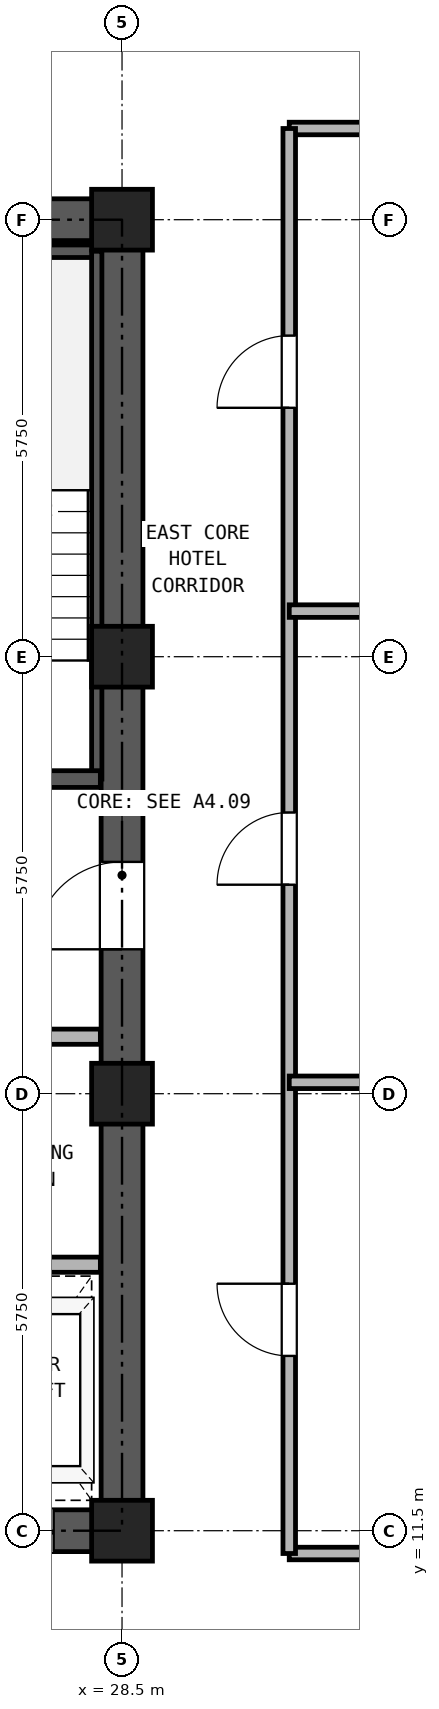
"""IFC4 building model, lengths in metres.
Left out: names, types, materials, properties, quantities, classifications, styles, units other than length and angle.
Written with IfcOpenShell. Run it as: python <this file> out.ifc"""

import sys

from ifc_helpers import new_model, si_unit, direction, frame, frame_2d, origin, origin_2d, place, context, subcontext, project, spatial, rectangle, hollow_rectangle, extrude, source, transform, mapped, element, fill, save


model = new_model("IFC4")
c1 = context("Model", 3, precision=1e-05, world=origin(), true_north=direction((0.0, 1.0)))
c2 = subcontext(c1, "Body", "Model", "MODEL_VIEW")
j1 = project(units=[si_unit("LENGTHUNIT", "METRE"), si_unit("PLANEANGLEUNIT", "RADIAN")], contexts=[c1])
p1 = place(None, origin())
s1 = spatial("IfcSite", under=j1, at=p1, CompositionType="ELEMENT")
p2 = place(p1, origin())
s2 = spatial("IfcBuilding", under=s1, at=p2, CompositionType="ELEMENT")
p3 = place(p2, frame((0.0, 0.0, 121.5)))
s3 = spatial("IfcBuildingStorey", under=s2, at=p3, CompositionType="ELEMENT", Elevation=121.5)
m1 = source(origin(), c2, "Body", "SweptSolid", [
    extrude(hollow_rectangle(XDim=0.8, YDim=0.8, WallThickness=0.045, at=origin_2d()), origin(), (0.0, 0.0, 1.0), 2.95),
])
for number, where, z_axis, x_axis in (
    (1, (28.5, 11.5, 0.0), (0.0, 0.0, 1.0), (1.0, 0.0, 0.0)),
    (2, (28.5, 17.25, 0.0), (0.0, 0.0, 1.0), (1.0, 0.0, 0.0)),
    (3, (28.5, 23.0, 0.0), (0.0, 0.0, 1.0), (1.0, 0.0, 0.0)),
    (4, (28.5, 28.75, 0.0), (0.0, 0.0, 1.0), (1.0, 0.0, 0.0)),
):
    element("IfcColumn", number, at=place(p3, frame(where, z_axis=z_axis, x_axis=x_axis)), inside=s3, PredefinedType="COLUMN", context=c2, shape_type="MappedRepresentation", body=[
        mapped(m1, transform((0.0, 0.0, 0.0), x_axis=(1.0, 0.0, 0.0), y_axis=(0.0, 1.0, 0.0), z_axis=(0.0, 0.0, 1.0), scale=1.0)),
    ])
p4 = place(p3, frame((18.225, 11.5, 0.0), z_axis=(0.0, 0.0, 1.0), x_axis=(1.0, 0.0, 0.0)))
e5 = element("IfcWall", 5, at=p4, inside=s3, PredefinedType="SHEAR", context=c2, shape_type="SweptSolid", body=[
    extrude(rectangle(XDim=10.55, YDim=0.55, at=frame_2d((5.275, 0.0))), origin(), (0.0, 0.0, 1.0), 2.95),
])
p5 = place(p4, frame((2.375, 0.0, 0.0)))
e6 = element("IfcOpeningElement", 6, at=p5, cuts=e5, PredefinedType="OPENING", context=c2, shape_type="SweptSolid", body=[
    extrude(rectangle(XDim=0.95, YDim=2.15, at=frame_2d((0.475, 1.075))), frame((0.0, 0.285, 0.0), z_axis=(0.0, -1.0, 0.0), x_axis=(1.0, 0.0, 0.0)), (0.0, 0.0, 1.0), 0.57),
])
p6 = place(p4, frame((5.875, 0.0, 0.0)))
e7 = element("IfcOpeningElement", 7, at=p6, cuts=e5, PredefinedType="OPENING", context=c2, shape_type="SweptSolid", body=[
    extrude(rectangle(XDim=1.1, YDim=2.25, at=frame_2d((0.55, 1.125))), frame((0.0, 0.285, 0.0), z_axis=(0.0, -1.0, 0.0), x_axis=(1.0, 0.0, 0.0)), (0.0, 0.0, 1.0), 0.57),
])
p7 = place(p4, frame((8.275, 0.0, 0.0)))
e8 = element("IfcOpeningElement", 8, at=p7, cuts=e5, PredefinedType="OPENING", context=c2, shape_type="SweptSolid", body=[
    extrude(rectangle(XDim=1.1, YDim=2.25, at=frame_2d((0.55, 1.125))), frame((0.0, 0.285, 0.0), z_axis=(0.0, -1.0, 0.0), x_axis=(1.0, 0.0, 0.0)), (0.0, 0.0, 1.0), 0.57),
])
p8 = place(p3, frame((18.225, 28.75, 0.0), z_axis=(0.0, 0.0, 1.0), x_axis=(1.0, 0.0, 0.0)))
e9 = element("IfcWall", 9, at=p8, inside=s3, PredefinedType="SHEAR", context=c2, shape_type="SweptSolid", body=[
    extrude(rectangle(XDim=10.55, YDim=0.55, at=frame_2d((5.275, 0.0))), origin(), (0.0, 0.0, 1.0), 2.95),
])
p9 = place(p8, frame((4.155, 0.0, 0.0)))
e10 = element("IfcOpeningElement", 10, at=p9, cuts=e9, PredefinedType="OPENING", context=c2, shape_type="SweptSolid", body=[
    extrude(rectangle(XDim=0.9, YDim=2.05, at=frame_2d((0.45, 1.025))), frame((0.0, 0.285, 0.0), z_axis=(0.0, -1.0, 0.0), x_axis=(1.0, 0.0, 0.0)), (0.0, 0.0, 1.0), 0.57),
])
p10 = place(p8, frame((5.695, 0.0, 0.0)))
e11 = element("IfcOpeningElement", 11, at=p10, cuts=e9, PredefinedType="OPENING", context=c2, shape_type="SweptSolid", body=[
    extrude(rectangle(XDim=0.9, YDim=2.05, at=frame_2d((0.45, 1.025))), frame((0.0, 0.285, 0.0), z_axis=(0.0, -1.0, 0.0), x_axis=(1.0, 0.0, 0.0)), (0.0, 0.0, 1.0), 0.57),
])
p11 = place(p3, frame((28.5, 11.775, 0.0), z_axis=(0.0, 0.0, 1.0), x_axis=(0.0, 1.0, 0.0)))
e12 = element("IfcWall", 12, at=p11, inside=s3, PredefinedType="SHEAR", context=c2, shape_type="SweptSolid", body=[
    extrude(rectangle(XDim=16.7, YDim=0.55, at=frame_2d((8.35, 0.0))), origin(), (0.0, 0.0, 1.0), 2.95),
])
p12 = place(p11, frame((7.375, 0.0, 0.0)))
e13 = element("IfcOpeningElement", 13, at=p12, cuts=e12, PredefinedType="OPENING", context=c2, shape_type="SweptSolid", body=[
    extrude(rectangle(XDim=1.15, YDim=2.2, at=frame_2d((0.575, 1.1))), frame((0.0, 0.285, 0.0), z_axis=(0.0, -1.0, 0.0), x_axis=(1.0, 0.0, 0.0)), (0.0, 0.0, 1.0), 0.57),
])
p13 = place(p3, frame((25.13, 28.335, 0.0), z_axis=(0.0, 0.0, 1.0), x_axis=(1.0, 0.0, 0.0)))
e14 = element("IfcWall", 14, at=p13, inside=s3, PredefinedType="PARTITIONING", context=c2, shape_type="SweptSolid", body=[
    extrude(rectangle(XDim=3.085, YDim=0.165, at=frame_2d((1.542, 0.0))), origin(), (0.0, 0.0, 1.0), 2.95),
])
p14 = place(p3, frame((28.167, 21.39, 0.0), z_axis=(0.0, 0.0, 1.0), x_axis=(0.0, 1.0, 0.0)))
e15 = element("IfcWall", 15, at=p14, inside=s3, PredefinedType="PARTITIONING", context=c2, shape_type="SweptSolid", body=[
    extrude(rectangle(XDim=6.945, YDim=0.135, at=frame_2d((3.473, 0.0))), origin(), (0.0, 0.0, 1.0), 2.95),
])
p15 = place(p3, frame((25.13, 21.39, 0.0), z_axis=(0.0, 0.0, 1.0), x_axis=(1.0, 0.0, 0.0)))
e16 = element("IfcWall", 16, at=p15, inside=s3, PredefinedType="SOLIDWALL", context=c2, shape_type="SweptSolid", body=[
    extrude(rectangle(XDim=3.085, YDim=0.22, at=frame_2d((1.542, 0.0))), origin(), (0.0, 0.0, 1.0), 2.95),
])
p16 = place(p15, frame((0.92, 0.0, 0.0)))
e17 = element("IfcOpeningElement", 17, at=p16, cuts=e16, PredefinedType="OPENING", context=c2, shape_type="SweptSolid", body=[
    extrude(rectangle(XDim=1.15, YDim=2.2, at=frame_2d((0.575, 1.1))), frame((0.0, 0.12, 0.0), z_axis=(0.0, -1.0, 0.0), x_axis=(1.0, 0.0, 0.0)), (0.0, 0.0, 1.0), 0.24),
])
p17 = place(p3, frame((18.785, 18.0, 0.0), z_axis=(0.0, 0.0, 1.0), x_axis=(1.0, 0.0, 0.0)))
e18 = element("IfcWall", 18, at=p17, inside=s3, PredefinedType="PARTITIONING", context=c2, shape_type="SweptSolid", body=[
    extrude(rectangle(XDim=9.43, YDim=0.2, at=frame_2d((4.715, 0.0))), origin(), (0.0, 0.0, 1.0), 2.95),
])
p18 = place(p17, frame((0.465, 0.0, 0.0)))
e19 = element("IfcOpeningElement", 19, at=p18, cuts=e18, PredefinedType="OPENING", context=c2, shape_type="SweptSolid", body=[
    extrude(rectangle(XDim=1.3, YDim=2.3, at=frame_2d((0.65, 1.15))), frame((0.0, 0.11, 0.0), z_axis=(0.0, -1.0, 0.0), x_axis=(1.0, 0.0, 0.0)), (0.0, 0.0, 1.0), 0.22),
])
p19 = place(p17, frame((2.565, 0.0, 0.0)))
e20 = element("IfcOpeningElement", 20, at=p19, cuts=e18, PredefinedType="OPENING", context=c2, shape_type="SweptSolid", body=[
    extrude(rectangle(XDim=1.3, YDim=2.3, at=frame_2d((0.65, 1.15))), frame((0.0, 0.11, 0.0), z_axis=(0.0, -1.0, 0.0), x_axis=(1.0, 0.0, 0.0)), (0.0, 0.0, 1.0), 0.22),
])
p20 = place(p17, frame((4.965, 0.0, 0.0)))
e21 = element("IfcOpeningElement", 21, at=p20, cuts=e18, PredefinedType="OPENING", context=c2, shape_type="SweptSolid", body=[
    extrude(rectangle(XDim=0.9, YDim=2.05, at=frame_2d((0.45, 1.025))), frame((0.0, 0.11, 0.0), z_axis=(0.0, -1.0, 0.0), x_axis=(1.0, 0.0, 0.0)), (0.0, 0.0, 1.0), 0.22),
])
p21 = place(p17, frame((7.665, 0.0, 0.0)))
e22 = element("IfcOpeningElement", 22, at=p21, cuts=e18, PredefinedType="OPENING", context=c2, shape_type="SweptSolid", body=[
    extrude(rectangle(XDim=0.9, YDim=2.05, at=frame_2d((0.45, 1.025))), frame((0.0, 0.11, 0.0), z_axis=(0.0, -1.0, 0.0), x_axis=(1.0, 0.0, 0.0)), (0.0, 0.0, 1.0), 0.22),
])
p22 = place(p3, frame((18.785, 15.0, 0.0), z_axis=(0.0, 0.0, 1.0), x_axis=(1.0, 0.0, 0.0)))
e23 = element("IfcWall", 23, at=p22, inside=s3, PredefinedType="PARTITIONING", context=c2, shape_type="SweptSolid", body=[
    extrude(rectangle(XDim=9.43, YDim=0.2, at=frame_2d((4.715, 0.0))), origin(), (0.0, 0.0, 1.0), 2.95),
])
for number, where, z_axis, x_axis in (
    (24, (30.7, 11.2, 0.0), (0.0, 0.0, 1.0), (1.0, 0.0, 0.0)),
    (25, (30.7, 29.95, 0.0), (0.0, 0.0, 1.0), (1.0, 0.0, 0.0)),
):
    element("IfcWall", number, at=place(p3, frame(where, z_axis=z_axis, x_axis=x_axis)), inside=s3, PredefinedType="PARTITIONING", context=c2, shape_type="SweptSolid", body=[
        extrude(rectangle(XDim=9.1, YDim=0.165, at=frame_2d((4.55, 0.0))), origin(), (0.0, 0.0, 1.0), 2.95),
    ])
p23 = place(p3, frame((30.7, 11.2, 0.0), z_axis=(0.0, 0.0, 1.0), x_axis=(0.0, 1.0, 0.0)))
e26 = element("IfcWall", 26, at=p23, inside=s3, PredefinedType="PARTITIONING", context=c2, shape_type="SweptSolid", body=[
    extrude(rectangle(XDim=18.75, YDim=0.165, at=frame_2d((9.375, 0.0))), origin(), (0.0, 0.0, 1.0), 2.95),
])
p24 = place(p23, frame((2.6, 0.0, 0.0)))
e27 = element("IfcOpeningElement", 27, at=p24, cuts=e26, PredefinedType="OPENING", context=c2, shape_type="SweptSolid", body=[
    extrude(rectangle(XDim=0.95, YDim=2.15, at=frame_2d((0.475, 1.075))), frame((0.0, 0.093, 0.0), z_axis=(0.0, -1.0, 0.0), x_axis=(1.0, 0.0, 0.0)), (0.0, 0.0, 1.0), 0.185),
])
p25 = place(p23, frame((8.8, 0.0, 0.0)))
e28 = element("IfcOpeningElement", 28, at=p25, cuts=e26, PredefinedType="OPENING", context=c2, shape_type="SweptSolid", body=[
    extrude(rectangle(XDim=0.95, YDim=2.15, at=frame_2d((0.475, 1.075))), frame((0.0, 0.093, 0.0), z_axis=(0.0, -1.0, 0.0), x_axis=(1.0, 0.0, 0.0)), (0.0, 0.0, 1.0), 0.185),
])
p26 = place(p23, frame((15.075, 0.0, 0.0)))
e29 = element("IfcOpeningElement", 29, at=p26, cuts=e26, PredefinedType="OPENING", context=c2, shape_type="SweptSolid", body=[
    extrude(rectangle(XDim=0.95, YDim=2.15, at=frame_2d((0.475, 1.075))), frame((0.0, 0.093, 0.0), z_axis=(0.0, -1.0, 0.0), x_axis=(1.0, 0.0, 0.0)), (0.0, 0.0, 1.0), 0.185),
])
p27 = place(p3, frame((30.7, 17.4, 0.0), z_axis=(0.0, 0.0, 1.0), x_axis=(1.0, 0.0, 0.0)))
e30 = element("IfcWall", 30, at=p27, inside=s3, PredefinedType="PARTITIONING", context=c2, shape_type="SweptSolid", body=[
    extrude(rectangle(XDim=16.14, YDim=0.165, at=frame_2d((8.07, 0.0))), origin(), (0.0, 0.0, 1.0), 2.247),
])
p28 = place(p3, frame((30.7, 23.6, 0.0), z_axis=(0.0, 0.0, 1.0), x_axis=(1.0, 0.0, 0.0)))
e31 = element("IfcWall", 31, at=p28, inside=s3, PredefinedType="PARTITIONING", context=c2, shape_type="SweptSolid", body=[
    extrude(rectangle(XDim=16.14, YDim=0.165, at=frame_2d((8.07, 0.0))), origin(), (0.0, 0.0, 1.0), 2.95),
])
p29 = place(p12, origin())
e32 = element("IfcDoor", 32, at=p29, inside=s3, OperationType="SINGLE_SWING_LEFT", PredefinedType="DOOR", context=c2, shape_type="SweptSolid", body=[
    extrude(rectangle(XDim=1.15, YDim=2.2, at=frame_2d((0.575, 1.1))), frame((0.0, 0.025, 0.0), z_axis=(0.0, -1.0, 0.0), x_axis=(1.0, 0.0, 0.0)), (0.0, 0.0, 1.0), 0.05),
])
fill(e13, e32)
p30 = place(p7, frame((1.1, 0.0, 0.0), z_axis=(0.0, 0.0, 1.0), x_axis=(-1.0, 0.0, 0.0)))
e33 = element("IfcDoor", 33, at=p30, inside=s3, OperationType="DOUBLE_DOOR_SLIDING", PredefinedType="DOOR", context=c2, shape_type="SweptSolid", body=[
    extrude(rectangle(XDim=1.1, YDim=2.25, at=frame_2d((0.55, 1.125))), frame((0.0, 0.025, 0.0), z_axis=(0.0, -1.0, 0.0), x_axis=(1.0, 0.0, 0.0)), (0.0, 0.0, 1.0), 0.05),
])
fill(e8, e33)
p31 = place(p24, origin())
e34 = element("IfcDoor", 34, at=p31, inside=s3, OperationType="SINGLE_SWING_RIGHT", PredefinedType="DOOR", context=c2, shape_type="SweptSolid", body=[
    extrude(rectangle(XDim=0.95, YDim=2.15, at=frame_2d((0.475, 1.075))), frame((0.0, 0.025, 0.0), z_axis=(0.0, -1.0, 0.0), x_axis=(1.0, 0.0, 0.0)), (0.0, 0.0, 1.0), 0.05),
])
fill(e27, e34)
p32 = place(p25, origin())
e35 = element("IfcDoor", 35, at=p32, inside=s3, OperationType="SINGLE_SWING_LEFT", PredefinedType="DOOR", context=c2, shape_type="SweptSolid", body=[
    extrude(rectangle(XDim=0.95, YDim=2.15, at=frame_2d((0.475, 1.075))), frame((0.0, 0.025, 0.0), z_axis=(0.0, -1.0, 0.0), x_axis=(1.0, 0.0, 0.0)), (0.0, 0.0, 1.0), 0.05),
])
fill(e28, e35)
p33 = place(p26, origin())
e36 = element("IfcDoor", 36, at=p33, inside=s3, OperationType="SINGLE_SWING_LEFT", PredefinedType="DOOR", context=c2, shape_type="SweptSolid", body=[
    extrude(rectangle(XDim=0.95, YDim=2.15, at=frame_2d((0.475, 1.075))), frame((0.0, 0.025, 0.0), z_axis=(0.0, -1.0, 0.0), x_axis=(1.0, 0.0, 0.0)), (0.0, 0.0, 1.0), 0.05),
])
fill(e29, e36)
save(model, sys.argv[1])
